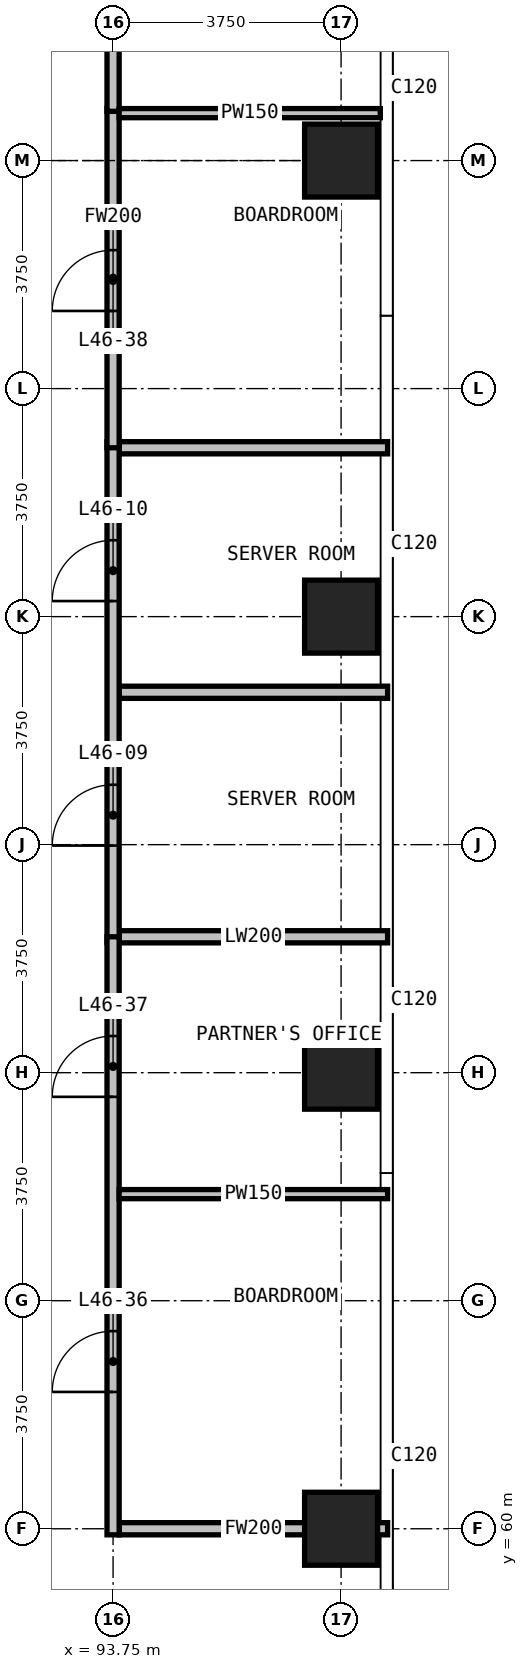
"""IFC4 building model, lengths in metres.
Left out: names, types, materials, properties, quantities, classifications, styles, units other than length and angle.
Written with IfcOpenShell. Run it as: python <this file> out.ifc"""

import sys

from ifc_helpers import new_model, si_unit, direction, frame, frame_2d, origin, origin_2d, place, context, subcontext, project, spatial, rectangle, extrude, element, fill, save


model = new_model("IFC4")
c1 = context("Model", 3, precision=1e-05, world=origin(), true_north=direction((0.0, 1.0)))
c2 = subcontext(c1, "Body", "Model", "MODEL_VIEW")
j1 = project(units=[si_unit("LENGTHUNIT", "METRE"), si_unit("PLANEANGLEUNIT", "RADIAN")], contexts=[c1])
p1 = place(None, origin())
s1 = spatial("IfcSite", under=j1, at=p1, CompositionType="ELEMENT")
p2 = place(p1, origin())
s2 = spatial("IfcBuilding", under=s1, at=p2, CompositionType="ELEMENT")
p3 = place(p2, frame((0.0, 0.0, 180.1)))
s3 = spatial("IfcBuildingStorey", under=s2, at=p3, CompositionType="ELEMENT", Elevation=180.1)
for number, where, z_axis, x_axis in (
    (1, (97.5, 60.0, 0.0), (0.0, 0.0, 1.0), (1.0, 0.0, 0.0)),
    (2, (97.5, 67.5, 0.0), (0.0, 0.0, 1.0), (1.0, 0.0, 0.0)),
    (3, (97.5, 75.0, 0.0), (0.0, 0.0, 1.0), (1.0, 0.0, 0.0)),
    (4, (97.5, 82.5, 0.0), (0.0, 0.0, 1.0), (1.0, 0.0, 0.0)),
):
    element("IfcColumn", number, at=place(p3, frame(where, z_axis=z_axis, x_axis=x_axis)), inside=s3, PredefinedType="COLUMN", context=c2, shape_type="SweptSolid", body=[
        extrude(rectangle(XDim=1.2, YDim=1.2, at=origin_2d()), origin(), (0.0, 0.0, 1.0), 3.6),
    ])
for number, where, z_axis, x_axis in (
    (5, (93.85, 69.735, 0.0), (0.0, 0.0, 1.0), (1.0, 0.0, 0.0)),
    (6, (93.85, 73.756, 0.0), (0.0, 0.0, 1.0), (1.0, 0.0, 0.0)),
    (7, (93.85, 77.777, 0.0), (0.0, 0.0, 1.0), (1.0, 0.0, 0.0)),
):
    element("IfcWall", number, at=place(p3, frame(where, z_axis=z_axis, x_axis=x_axis)), inside=s3, PredefinedType="PARTITIONING", context=c2, shape_type="SweptSolid", body=[
        extrude(rectangle(XDim=4.415, YDim=0.2, at=frame_2d((2.208, 0.0))), origin(), (0.0, 0.0, 1.0), 3.25),
    ])
p4 = place(p3, frame((93.75, 69.635, 0.0), z_axis=(0.0, 0.0, 1.0), x_axis=(0.0, 1.0, 0.0)))
e8 = element("IfcWall", 8, at=p4, inside=s3, PredefinedType="PARTITIONING", context=c2, shape_type="SweptSolid", body=[
    extrude(rectangle(XDim=8.242, YDim=0.2, at=frame_2d((4.121, 0.0))), origin(), (0.0, 0.0, 1.0), 3.25),
])
p5 = place(p4, frame((1.6, 0.0, 0.0)))
e9 = element("IfcOpeningElement", 9, at=p5, cuts=e8, PredefinedType="OPENING", context=c2, shape_type="SweptSolid", body=[
    extrude(rectangle(XDim=1.0, YDim=2.2, at=frame_2d((0.5, 1.1))), frame((0.0, 0.11, 0.0), z_axis=(0.0, -1.0, 0.0), x_axis=(1.0, 0.0, 0.0)), (0.0, 0.0, 1.0), 0.22),
])
p6 = place(p4, frame((5.621, 0.0, 0.0)))
e10 = element("IfcOpeningElement", 10, at=p6, cuts=e8, PredefinedType="OPENING", context=c2, shape_type="SweptSolid", body=[
    extrude(rectangle(XDim=1.0, YDim=2.2, at=frame_2d((0.5, 1.1))), frame((0.0, 0.11, 0.0), z_axis=(0.0, -1.0, 0.0), x_axis=(1.0, 0.0, 0.0)), (0.0, 0.0, 1.0), 0.22),
])
p7 = place(p3, frame((93.85, 60.0, 0.0), z_axis=(0.0, 0.0, 1.0), x_axis=(1.0, 0.0, 0.0)))
e11 = element("IfcWall", 11, at=p7, inside=s3, PredefinedType="PARTITIONING", context=c2, shape_type="SweptSolid", body=[
    extrude(rectangle(XDim=4.415, YDim=0.2, at=frame_2d((2.208, 0.0))), origin(), (0.0, 0.0, 1.0), 3.25),
])
p8 = place(p3, frame((93.75, 59.9, 0.0), z_axis=(0.0, 0.0, 1.0), x_axis=(0.0, 1.0, 0.0)))
e12 = element("IfcWall", 12, at=p8, inside=s3, PredefinedType="PARTITIONING", context=c2, shape_type="SweptSolid", body=[
    extrude(rectangle(XDim=9.835, YDim=0.2, at=frame_2d((4.917, 0.0))), origin(), (0.0, 0.0, 1.0), 3.25),
])
p9 = place(p8, frame((2.35, 0.0, 0.0)))
e13 = element("IfcOpeningElement", 13, at=p9, cuts=e12, PredefinedType="OPENING", context=c2, shape_type="SweptSolid", body=[
    extrude(rectangle(XDim=1.0, YDim=2.2, at=frame_2d((0.5, 1.1))), frame((0.0, 0.11, 0.0), z_axis=(0.0, -1.0, 0.0), x_axis=(1.0, 0.0, 0.0)), (0.0, 0.0, 1.0), 0.22),
])
p10 = place(p8, frame((7.203, 0.0, 0.0)))
e14 = element("IfcOpeningElement", 14, at=p10, cuts=e12, PredefinedType="OPENING", context=c2, shape_type="SweptSolid", body=[
    extrude(rectangle(XDim=1.0, YDim=2.2, at=frame_2d((0.5, 1.1))), frame((0.0, 0.11, 0.0), z_axis=(0.0, -1.0, 0.0), x_axis=(1.0, 0.0, 0.0)), (0.0, 0.0, 1.0), 0.22),
])
p11 = place(p3, frame((93.75, 77.777, 0.0), z_axis=(0.0, 0.0, 1.0), x_axis=(0.0, 1.0, 0.0)))
e15 = element("IfcWall", 15, at=p11, inside=s3, PredefinedType="PARTITIONING", context=c2, shape_type="SweptSolid", body=[
    extrude(rectangle(XDim=5.578, YDim=0.2, at=frame_2d((2.789, 0.0))), origin(), (0.0, 0.0, 1.0), 3.25),
])
p12 = place(p11, frame((2.25, 0.0, 0.0)))
e16 = element("IfcOpeningElement", 16, at=p12, cuts=e15, PredefinedType="OPENING", context=c2, shape_type="SweptSolid", body=[
    extrude(rectangle(XDim=1.0, YDim=2.2, at=frame_2d((0.5, 1.1))), frame((0.0, 0.11, 0.0), z_axis=(0.0, -1.0, 0.0), x_axis=(1.0, 0.0, 0.0)), (0.0, 0.0, 1.0), 0.22),
])
p13 = place(p3, frame((93.75, 83.31, 0.0), z_axis=(0.0, 0.0, 1.0), x_axis=(0.0, 1.0, 0.0)))
e17 = element("IfcWall", 17, at=p13, inside=s3, PredefinedType="PARTITIONING", context=c2, shape_type="SweptSolid", body=[
    extrude(rectangle(XDim=7.335, YDim=0.2, at=frame_2d((3.667, 0.0))), origin(), (0.0, 0.0, 1.0), 3.25),
])
p14 = place(p3, frame((93.85, 65.503, 0.0), z_axis=(0.0, 0.0, 1.0), x_axis=(1.0, 0.0, 0.0)))
e18 = element("IfcWall", 18, at=p14, inside=s3, PredefinedType="PARTITIONING", context=c2, shape_type="SweptSolid", body=[
    extrude(rectangle(XDim=4.415, YDim=0.15, at=frame_2d((2.208, 0.0))), origin(), (0.0, 0.0, 1.0), 3.25),
])
p15 = place(p3, frame((93.85, 83.28, 0.0), z_axis=(0.0, 0.0, 1.0), x_axis=(1.0, 0.0, 0.0)))
e19 = element("IfcWall", 19, at=p15, inside=s3, PredefinedType="PARTITIONING", context=c2, shape_type="SweptSolid", body=[
    extrude(rectangle(XDim=4.295, YDim=0.15, at=frame_2d((2.147, 0.0))), origin(), (0.0, 0.0, 1.0), 3.25),
])
p16 = place(p5, origin())
e20 = element("IfcDoor", 20, at=p16, inside=s3, OperationType="SINGLE_SWING_RIGHT", PredefinedType="DOOR", context=c2, shape_type="SweptSolid", body=[
    extrude(rectangle(XDim=1.0, YDim=2.2, at=frame_2d((0.5, 1.1))), frame((0.0, 0.025, 0.0), z_axis=(0.0, -1.0, 0.0), x_axis=(1.0, 0.0, 0.0)), (0.0, 0.0, 1.0), 0.05),
])
fill(e9, e20)
p17 = place(p6, origin())
e21 = element("IfcDoor", 21, at=p17, inside=s3, OperationType="SINGLE_SWING_LEFT", PredefinedType="DOOR", context=c2, shape_type="SweptSolid", body=[
    extrude(rectangle(XDim=1.0, YDim=2.2, at=frame_2d((0.5, 1.1))), frame((0.0, 0.025, 0.0), z_axis=(0.0, -1.0, 0.0), x_axis=(1.0, 0.0, 0.0)), (0.0, 0.0, 1.0), 0.05),
])
fill(e10, e21)
p18 = place(p9, origin())
e22 = element("IfcDoor", 22, at=p18, inside=s3, OperationType="SINGLE_SWING_LEFT", PredefinedType="DOOR", context=c2, shape_type="SweptSolid", body=[
    extrude(rectangle(XDim=1.0, YDim=2.2, at=frame_2d((0.5, 1.1))), frame((0.0, 0.025, 0.0), z_axis=(0.0, -1.0, 0.0), x_axis=(1.0, 0.0, 0.0)), (0.0, 0.0, 1.0), 0.05),
])
fill(e13, e22)
p19 = place(p10, origin())
e23 = element("IfcDoor", 23, at=p19, inside=s3, OperationType="SINGLE_SWING_LEFT", PredefinedType="DOOR", context=c2, shape_type="SweptSolid", body=[
    extrude(rectangle(XDim=1.0, YDim=2.2, at=frame_2d((0.5, 1.1))), frame((0.0, 0.025, 0.0), z_axis=(0.0, -1.0, 0.0), x_axis=(1.0, 0.0, 0.0)), (0.0, 0.0, 1.0), 0.05),
])
fill(e14, e23)
p20 = place(p12, origin())
e24 = element("IfcDoor", 24, at=p20, inside=s3, OperationType="SINGLE_SWING_LEFT", PredefinedType="DOOR", context=c2, shape_type="SweptSolid", body=[
    extrude(rectangle(XDim=1.0, YDim=2.2, at=frame_2d((0.5, 1.1))), frame((0.0, 0.025, 0.0), z_axis=(0.0, -1.0, 0.0), x_axis=(1.0, 0.0, 0.0)), (0.0, 0.0, 1.0), 0.05),
])
fill(e16, e24)
save(model, sys.argv[1])
